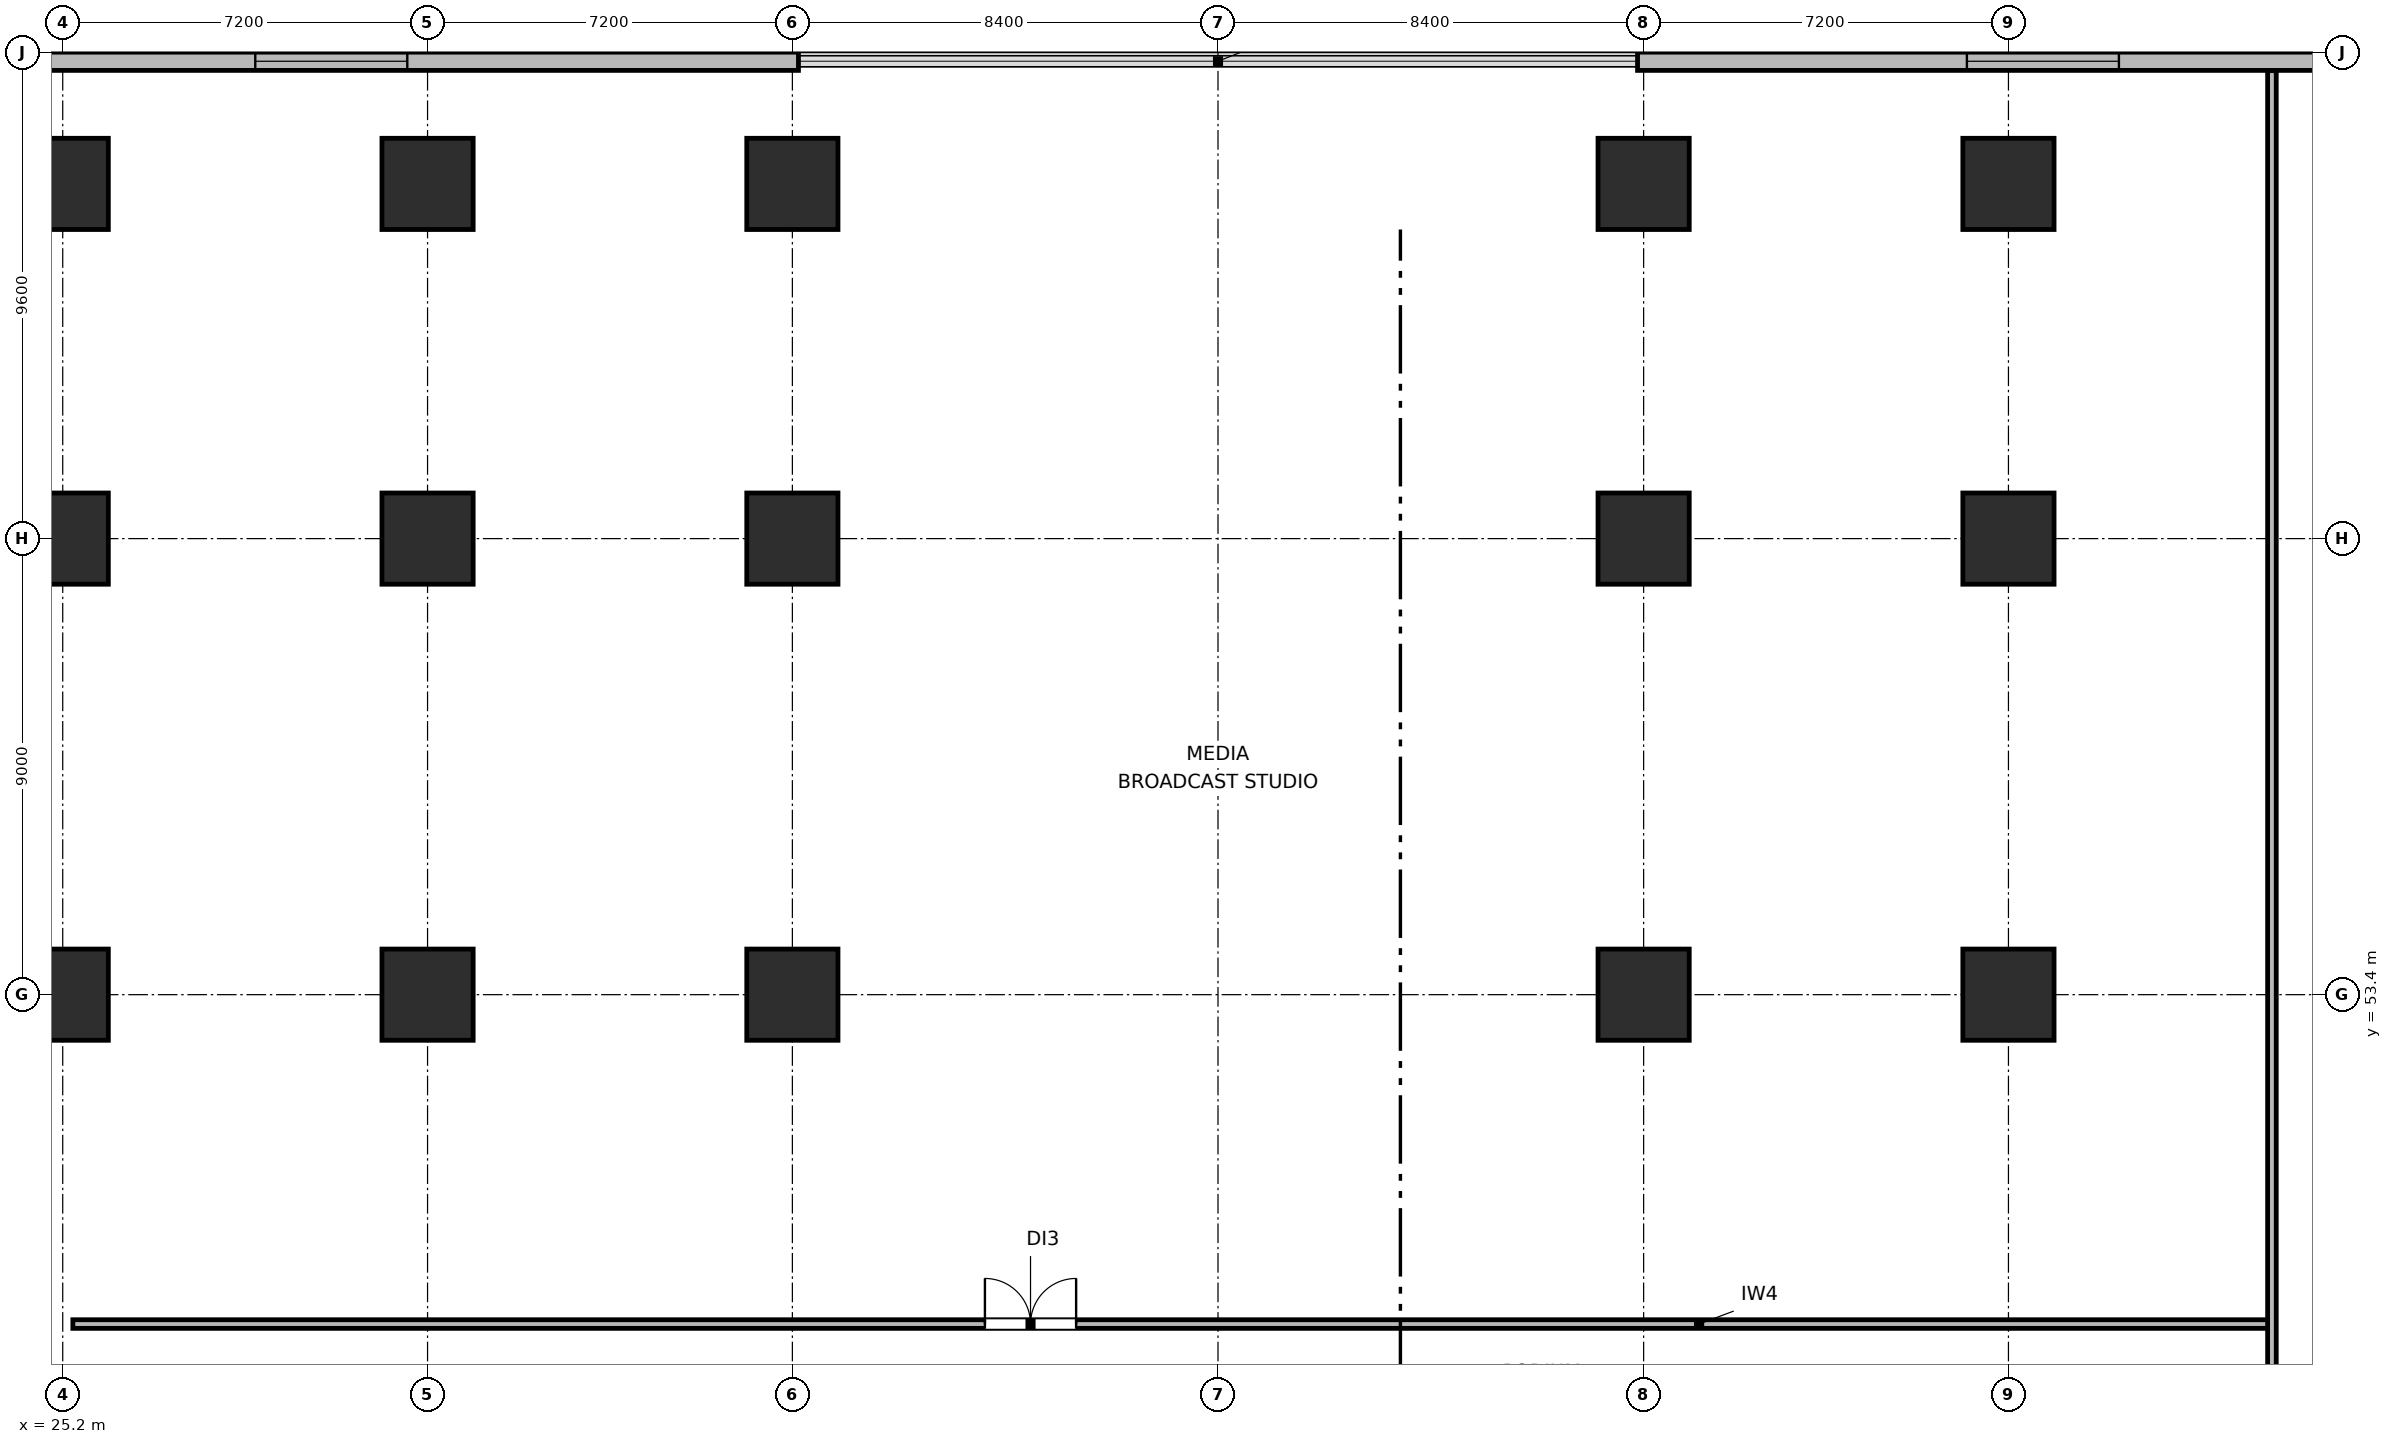
"""IFC4 building model, lengths in metres.
Left out: names, types, materials, properties, quantities, classifications, styles, units other than length and angle.
Written with IfcOpenShell. Run it as: python <this file> out.ifc"""

import sys

from ifc_helpers import new_model, si_unit, direction, frame, frame_2d, origin, origin_2d, place, context, subcontext, project, spatial, rectangle, extrude, element, fill, save


model = new_model("IFC4")
c1 = context("Model", 3, precision=1e-05, world=origin(), true_north=direction((0.0, 1.0)))
c2 = subcontext(c1, "Body", "Model", "MODEL_VIEW")
j1 = project(units=[si_unit("LENGTHUNIT", "METRE"), si_unit("PLANEANGLEUNIT", "RADIAN")], contexts=[c1])
p1 = place(None, origin())
s1 = spatial("IfcSite", under=j1, at=p1, CompositionType="ELEMENT")
p2 = place(p1, origin())
s2 = spatial("IfcBuilding", under=s1, at=p2, CompositionType="ELEMENT")
p3 = place(p2, frame((0.0, 0.0, 4.5)))
s3 = spatial("IfcBuildingStorey", under=s2, at=p3, CompositionType="ELEMENT", Elevation=4.5)
for number, where, z_axis, x_axis in (
    (1, (25.2, 53.4, 0.0), (0.0, 0.0, 1.0), (1.0, 0.0, 0.0)),
    (2, (25.2, 62.4, 0.0), (0.0, 0.0, 1.0), (1.0, 0.0, 0.0)),
    (3, (25.2, 69.4, 0.0), (0.0, 0.0, 1.0), (1.0, 0.0, 0.0)),
    (4, (32.4, 53.4, 0.0), (0.0, 0.0, 1.0), (1.0, 0.0, 0.0)),
    (5, (32.4, 62.4, 0.0), (0.0, 0.0, 1.0), (1.0, 0.0, 0.0)),
    (6, (32.4, 69.4, 0.0), (0.0, 0.0, 1.0), (1.0, 0.0, 0.0)),
    (7, (39.6, 53.4, 0.0), (0.0, 0.0, 1.0), (1.0, 0.0, 0.0)),
    (8, (39.6, 62.4, 0.0), (0.0, 0.0, 1.0), (1.0, 0.0, 0.0)),
    (9, (39.6, 69.4, 0.0), (0.0, 0.0, 1.0), (1.0, 0.0, 0.0)),
    (10, (56.4, 53.4, 0.0), (0.0, 0.0, 1.0), (1.0, 0.0, 0.0)),
    (11, (56.4, 62.4, 0.0), (0.0, 0.0, 1.0), (1.0, 0.0, 0.0)),
    (12, (56.4, 69.4, 0.0), (0.0, 0.0, 1.0), (1.0, 0.0, 0.0)),
    (13, (63.6, 53.4, 0.0), (0.0, 0.0, 1.0), (1.0, 0.0, 0.0)),
    (14, (63.6, 62.4, 0.0), (0.0, 0.0, 1.0), (1.0, 0.0, 0.0)),
    (15, (63.6, 69.4, 0.0), (0.0, 0.0, 1.0), (1.0, 0.0, 0.0)),
):
    element("IfcColumn", number, at=place(p3, frame(where, z_axis=z_axis, x_axis=x_axis)), inside=s3, PredefinedType="COLUMN", context=c2, shape_type="SweptSolid", body=[
        extrude(rectangle(XDim=1.8, YDim=1.8, at=origin_2d()), origin(), (0.0, 0.0, 1.0), 4.2),
    ])
p4 = place(p3, frame((0.0, 71.82, 0.0), z_axis=(0.0, 0.0, 1.0), x_axis=(1.0, 0.0, 0.0)))
e16 = element("IfcWall", 16, at=p4, inside=s3, PredefinedType="SOLIDWALL", context=c2, shape_type="SweptSolid", body=[
    extrude(rectangle(XDim=39.72, YDim=0.36, at=frame_2d((19.86, 0.0))), origin(), (0.0, 0.0, 1.0), 3.88),
])
p5 = place(p4, frame((13.0, 0.0, 0.7)))
e17 = element("IfcOpeningElement", 17, at=p5, cuts=e16, PredefinedType="OPENING", context=c2, shape_type="SweptSolid", body=[
    extrude(rectangle(XDim=3.0, YDim=1.8, at=frame_2d((1.5, 0.9))), frame((0.0, 0.19, 0.0), z_axis=(0.0, -1.0, 0.0), x_axis=(1.0, 0.0, 0.0)), (0.0, 0.0, 1.0), 0.38),
])
p6 = place(p4, frame((29.0, 0.0, 0.7)))
e18 = element("IfcOpeningElement", 18, at=p6, cuts=e16, PredefinedType="OPENING", context=c2, shape_type="SweptSolid", body=[
    extrude(rectangle(XDim=3.0, YDim=1.8, at=frame_2d((1.5, 0.9))), frame((0.0, 0.19, 0.0), z_axis=(0.0, -1.0, 0.0), x_axis=(1.0, 0.0, 0.0)), (0.0, 0.0, 1.0), 0.38),
])
p7 = place(p3, frame((56.28, 71.82, 0.0), z_axis=(0.0, 0.0, 1.0), x_axis=(1.0, 0.0, 0.0)))
e19 = element("IfcWall", 19, at=p7, inside=s3, PredefinedType="SOLIDWALL", context=c2, shape_type="SweptSolid", body=[
    extrude(rectangle(XDim=39.72, YDim=0.36, at=frame_2d((19.86, 0.0))), origin(), (0.0, 0.0, 1.0), 3.88),
])
p8 = place(p7, frame((6.5, 0.0, 0.7)))
e20 = element("IfcOpeningElement", 20, at=p8, cuts=e19, PredefinedType="OPENING", context=c2, shape_type="SweptSolid", body=[
    extrude(rectangle(XDim=3.0, YDim=1.8, at=frame_2d((1.5, 0.9))), frame((0.0, 0.19, 0.0), z_axis=(0.0, -1.0, 0.0), x_axis=(1.0, 0.0, 0.0)), (0.0, 0.0, 1.0), 0.38),
])
p9 = place(p7, frame((29.0, 0.0, 0.7)))
e21 = element("IfcOpeningElement", 21, at=p9, cuts=e19, PredefinedType="OPENING", context=c2, shape_type="SweptSolid", body=[
    extrude(rectangle(XDim=3.0, YDim=1.8, at=frame_2d((1.5, 0.9))), frame((0.0, 0.19, 0.0), z_axis=(0.0, -1.0, 0.0), x_axis=(1.0, 0.0, 0.0)), (0.0, 0.0, 1.0), 0.38),
])
p10 = place(p3, frame((25.4, 46.9, 0.0), z_axis=(0.0, 0.0, 1.0), x_axis=(1.0, 0.0, 0.0)))
e22 = element("IfcWall", 22, at=p10, inside=s3, PredefinedType="PARTITIONING", context=c2, shape_type="SweptSolid", body=[
    extrude(rectangle(XDim=43.4, YDim=0.17, at=frame_2d((21.7, 0.0))), origin(), (0.0, 0.0, 1.0), 3.88),
])
p11 = place(p10, frame((18.0, 0.0, 0.0)))
e23 = element("IfcOpeningElement", 23, at=p11, cuts=e22, PredefinedType="OPENING", context=c2, shape_type="SweptSolid", body=[
    extrude(rectangle(XDim=1.8, YDim=2.06, at=frame_2d((0.9, 1.03))), frame((0.0, 0.095, 0.0), z_axis=(0.0, -1.0, 0.0), x_axis=(1.0, 0.0, 0.0)), (0.0, 0.0, 1.0), 0.19),
])
p12 = place(p3, frame((68.8, 25.187, 0.0), z_axis=(0.0, 0.0, 1.0), x_axis=(0.0, 1.0, 0.0)))
e24 = element("IfcWall", 24, at=p12, inside=s3, PredefinedType="PARTITIONING", context=c2, shape_type="SweptSolid", body=[
    extrude(rectangle(XDim=46.448, YDim=0.17, at=frame_2d((23.224, 0.0))), origin(), (0.0, 0.0, 1.0), 3.88),
])
p13 = place(p12, frame((15.913, 0.0, 0.0)))
e25 = element("IfcOpeningElement", 25, at=p13, cuts=e24, PredefinedType="OPENING", context=c2, shape_type="SweptSolid", body=[
    extrude(rectangle(XDim=1.1, YDim=2.05, at=frame_2d((0.55, 1.025))), frame((0.0, 0.095, 0.0), z_axis=(0.0, -1.0, 0.0), x_axis=(1.0, 0.0, 0.0)), (0.0, 0.0, 1.0), 0.19),
])
p14 = place(p6, origin())
e26 = element("IfcWindow", 26, at=p14, inside=s3, PartitioningType="SINGLE_PANEL", PredefinedType="WINDOW", context=c2, shape_type="SweptSolid", body=[
    extrude(rectangle(XDim=3.0, YDim=1.8, at=frame_2d((1.5, 0.9))), frame((0.0, 0.03, 0.0), z_axis=(0.0, -1.0, 0.0), x_axis=(1.0, 0.0, 0.0)), (0.0, 0.0, 1.0), 0.06),
])
fill(e18, e26)
p15 = place(p8, origin())
e27 = element("IfcWindow", 27, at=p15, inside=s3, PartitioningType="SINGLE_PANEL", PredefinedType="WINDOW", context=c2, shape_type="SweptSolid", body=[
    extrude(rectangle(XDim=3.0, YDim=1.8, at=frame_2d((1.5, 0.9))), frame((0.0, 0.03, 0.0), z_axis=(0.0, -1.0, 0.0), x_axis=(1.0, 0.0, 0.0)), (0.0, 0.0, 1.0), 0.06),
])
fill(e20, e27)
p16 = place(p11, origin())
e28 = element("IfcDoor", 28, at=p16, inside=s3, OperationType="DOUBLE_DOOR_SINGLE_SWING", PredefinedType="DOOR", context=c2, shape_type="SweptSolid", body=[
    extrude(rectangle(XDim=1.8, YDim=2.06, at=frame_2d((0.9, 1.03))), frame((0.0, 0.025, 0.0), z_axis=(0.0, -1.0, 0.0), x_axis=(1.0, 0.0, 0.0)), (0.0, 0.0, 1.0), 0.05),
])
fill(e23, e28)
save(model, sys.argv[1])
